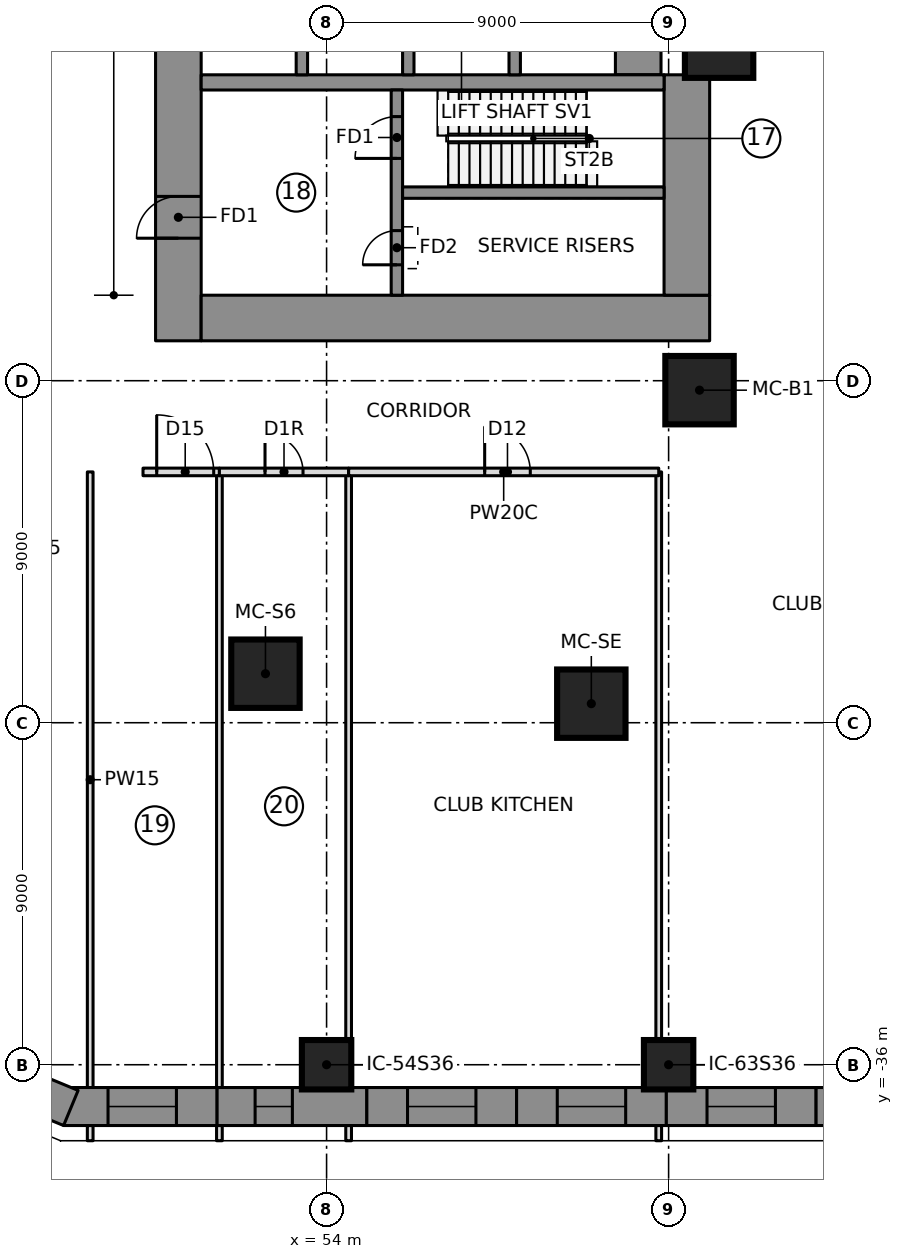
"""IFC4 building model, lengths in metres.
Left out: names, types, materials, properties, quantities, classifications, styles, units other than length and angle.
Written with IfcOpenShell. Run it as: python <this file> out.ifc"""

import sys

from ifc_helpers import new_model, si_unit, direction, frame, frame_2d, origin, origin_2d, place, context, subcontext, project, spatial, polyline, rectangle, outline, extrude, element, fill, save


model = new_model("IFC4")
c1 = context("Model", 3, precision=1e-05, world=origin(), true_north=direction((0.0, 1.0)))
c2 = subcontext(c1, "Body", "Model", "MODEL_VIEW")
j1 = project(units=[si_unit("LENGTHUNIT", "METRE"), si_unit("PLANEANGLEUNIT", "RADIAN")], contexts=[c1])
p1 = place(None, origin())
s1 = spatial("IfcSite", under=j1, at=p1, CompositionType="ELEMENT")
p2 = place(p1, origin())
s2 = spatial("IfcBuilding", under=s1, at=p2, CompositionType="ELEMENT")
p3 = place(p2, frame((0.0, 0.0, 24.0)))
s3 = spatial("IfcBuildingStorey", under=s2, at=p3, CompositionType="ELEMENT", Elevation=24.0)
p4 = place(p3, frame((50.1, -16.95, 0.0), z_axis=(0.0, 0.0, 1.0), x_axis=(0.0, 1.0, 0.0)))
e1 = element("IfcWall", 1, at=p4, inside=s3, PredefinedType="SHEAR", context=c2, shape_type="SweptSolid", body=[
    extrude(rectangle(XDim=10.3, YDim=1.2, at=frame_2d((5.15, 0.0))), origin(), (0.0, 0.0, 1.0), 5.0),
])
p5 = place(p4, frame((2.7, 0.0, 0.0)))
e2 = element("IfcOpeningElement", 2, at=p5, cuts=e1, PredefinedType="OPENING", context=c2, shape_type="SweptSolid", body=[
    extrude(rectangle(XDim=1.1, YDim=2.1, at=frame_2d((0.55, 1.05))), frame((0.0, 0.61, 0.0), z_axis=(0.0, -1.0, 0.0), x_axis=(1.0, 0.0, 0.0)), (0.0, 0.0, 1.0), 1.22),
])
p6 = place(p3, frame((50.7, -16.35, 0.0), z_axis=(0.0, 0.0, 1.0), x_axis=(1.0, 0.0, 0.0)))
e3 = element("IfcWall", 3, at=p6, inside=s3, PredefinedType="SHEAR", context=c2, shape_type="SweptSolid", body=[
    extrude(rectangle(XDim=13.38, YDim=1.2, at=frame_2d((6.69, 0.0))), origin(), (0.0, 0.0, 1.0), 5.0),
])
p7 = place(p3, frame((63.48, -15.75, 0.0), z_axis=(0.0, 0.0, 1.0), x_axis=(0.0, 1.0, 0.0)))
e4 = element("IfcWall", 4, at=p7, inside=s3, PredefinedType="SHEAR", context=c2, shape_type="SweptSolid", body=[
    extrude(rectangle(XDim=5.8, YDim=1.2, at=frame_2d((2.9, 0.0))), origin(), (0.0, 0.0, 1.0), 5.0),
])
p8 = place(p3, frame((62.2, -9.95, 0.0), z_axis=(0.0, 0.0, 1.0), x_axis=(0.0, 1.0, 0.0)))
e5 = element("IfcWall", 5, at=p8, inside=s3, PredefinedType="SHEAR", context=c2, shape_type="SweptSolid", body=[
    extrude(rectangle(XDim=19.9, YDim=1.2, at=frame_2d((9.95, 0.0))), origin(), (0.0, 0.0, 1.0), 5.0),
])
p9 = place(p3, frame((50.7, -10.15, 0.0), z_axis=(0.0, 0.0, 1.0), x_axis=(1.0, 0.0, 0.0)))
e6 = element("IfcWall", 6, at=p9, inside=s3, PredefinedType="SHEAR", context=c2, shape_type="SweptSolid", body=[
    extrude(rectangle(XDim=12.18, YDim=0.4, at=frame_2d((6.09, 0.0))), origin(), (0.0, 0.0, 1.0), 5.0),
])
for number, where, z_axis, x_axis in (
    (7, (53.35, -9.95, 0.0), (0.0, 0.0, 1.0), (0.0, 1.0, 0.0)),
    (8, (56.15, -9.95, 0.0), (0.0, 0.0, 1.0), (0.0, 1.0, 0.0)),
    (9, (58.95, -9.95, 0.0), (0.0, 0.0, 1.0), (0.0, 1.0, 0.0)),
):
    element("IfcWall", number, at=place(p3, frame(where, z_axis=z_axis, x_axis=x_axis)), inside=s3, PredefinedType="SHEAR", context=c2, shape_type="SweptSolid", body=[
        extrude(rectangle(XDim=3.0, YDim=0.3, at=frame_2d((1.5, 0.0))), origin(), (0.0, 0.0, 1.0), 5.0),
    ])
p10 = place(p3, frame((55.85, -15.75, 0.0), z_axis=(0.0, 0.0, 1.0), x_axis=(0.0, 1.0, 0.0)))
e10 = element("IfcWall", 10, at=p10, inside=s3, PredefinedType="SHEAR", context=c2, shape_type="SweptSolid", body=[
    extrude(rectangle(XDim=5.4, YDim=0.3, at=frame_2d((2.7, 0.0))), origin(), (0.0, 0.0, 1.0), 5.0),
])
p11 = place(p10, frame((3.6, 0.0, 0.0)))
e11 = element("IfcOpeningElement", 11, at=p11, cuts=e10, PredefinedType="OPENING", context=c2, shape_type="SweptSolid", body=[
    extrude(rectangle(XDim=1.1, YDim=2.1, at=frame_2d((0.55, 1.05))), frame((0.0, 0.16, 0.0), z_axis=(0.0, -1.0, 0.0), x_axis=(1.0, 0.0, 0.0)), (0.0, 0.0, 1.0), 0.32),
])
p12 = place(p10, frame((0.8, 0.0, 0.0)))
e12 = element("IfcOpeningElement", 12, at=p12, cuts=e10, PredefinedType="OPENING", context=c2, shape_type="SweptSolid", body=[
    extrude(rectangle(XDim=0.9, YDim=2.1, at=frame_2d((0.45, 1.05))), frame((0.0, 0.16, 0.0), z_axis=(0.0, -1.0, 0.0), x_axis=(1.0, 0.0, 0.0)), (0.0, 0.0, 1.0), 0.32),
])
p13 = place(p3, frame((56.0, -13.05, 0.0), z_axis=(0.0, 0.0, 1.0), x_axis=(1.0, 0.0, 0.0)))
e13 = element("IfcWall", 13, at=p13, inside=s3, PredefinedType="SHEAR", context=c2, shape_type="SweptSolid", body=[
    extrude(rectangle(XDim=6.88, YDim=0.3, at=frame_2d((3.44, 0.0))), origin(), (0.0, 0.0, 1.0), 5.0),
])
for number, where, z_axis, x_axis in (
    (14, (52.392, -25.71, 0.0), (0.0, 0.0, 1.0), (1.0, 0.0, 0.0)),
    (15, (60.966, -26.499, 0.0), (0.0, 0.0, 1.0), (1.0, 0.0, 0.0)),
    (16, (63.813, -18.249, 0.0), (0.0, 0.0, 1.0), (1.0, 0.0, 0.0)),
    (17, (64.328, -9.131, 0.0), (0.0, 0.0, 1.0), (1.0, 0.0, 0.0)),
):
    element("IfcColumn", number, at=place(p3, frame(where, z_axis=z_axis, x_axis=x_axis)), inside=s3, PredefinedType="COLUMN", context=c2, shape_type="SweptSolid", body=[
        extrude(rectangle(XDim=1.8, YDim=1.8, at=origin_2d()), origin(), (0.0, 0.0, 1.0), 5.0),
    ])
for number, where, z_axis, x_axis in (
    (18, (54.0, -36.0, 0.0), (0.0, 0.0, 1.0), (1.0, 0.0, 0.0)),
    (19, (63.0, -36.0, 0.0), (0.0, 0.0, 1.0), (1.0, 0.0, 0.0)),
):
    element("IfcColumn", number, at=place(p3, frame(where, z_axis=z_axis, x_axis=x_axis)), inside=s3, PredefinedType="COLUMN", context=c2, shape_type="SweptSolid", body=[
        extrude(rectangle(XDim=1.3, YDim=1.3, at=origin_2d()), origin(), (0.0, 0.0, 1.0), 4.65),
    ])
p14 = place(p3, frame((47.179, -37.1, 0.0), z_axis=(0.0, 0.0, 1.0), x_axis=(1.0, 0.0, 0.0)))
e20 = element("IfcWall", 20, at=p14, inside=s3, PredefinedType="NOTDEFINED", context=c2, shape_type="SweptSolid", body=[
    extrude(outline(polyline([(-0.1, -0.5), (3.94, -0.5), (3.94, 0.5), (0.1, 0.5), (-0.1, -0.5)])), origin(), (0.0, 0.0, 1.0), 4.7),
])
p15 = place(p14, frame((1.07, 0.0, 0.9)))
e21 = element("IfcOpeningElement", 21, at=p15, cuts=e20, PredefinedType="OPENING", context=c2, shape_type="SweptSolid", body=[
    extrude(rectangle(XDim=1.8, YDim=2.4, at=frame_2d((0.9, 1.2))), frame((0.0, 0.51, 0.0), z_axis=(0.0, -1.0, 0.0), x_axis=(1.0, 0.0, 0.0)), (0.0, 0.0, 1.0), 1.02),
])
p16 = place(p3, frame((51.119, -37.1, 0.0), z_axis=(0.0, 0.0, 1.0), x_axis=(1.0, 0.0, 0.0)))
e22 = element("IfcWall", 22, at=p16, inside=s3, PredefinedType="NOTDEFINED", context=c2, shape_type="SweptSolid", body=[
    extrude(outline(polyline([(0.0, -0.5), (3.94, -0.5), (3.94, 0.5), (0.0, 0.5), (0.0, -0.5)])), origin(), (0.0, 0.0, 1.0), 4.7),
])
p17 = place(p16, frame((1.0, 0.0, 0.9)))
e23 = element("IfcOpeningElement", 23, at=p17, cuts=e22, PredefinedType="OPENING", context=c2, shape_type="SweptSolid", body=[
    extrude(rectangle(XDim=0.981, YDim=2.4, at=frame_2d((0.49, 1.2))), frame((0.0, 0.51, 0.0), z_axis=(0.0, -1.0, 0.0), x_axis=(1.0, 0.0, 0.0)), (0.0, 0.0, 1.0), 1.02),
])
p18 = place(p3, frame((55.06, -37.1, 0.0), z_axis=(0.0, 0.0, 1.0), x_axis=(1.0, 0.0, 0.0)))
e24 = element("IfcWall", 24, at=p18, inside=s3, PredefinedType="NOTDEFINED", context=c2, shape_type="SweptSolid", body=[
    extrude(outline(polyline([(0.0, -0.5), (3.94, -0.5), (3.94, 0.5), (0.0, 0.5), (0.0, -0.5)])), origin(), (0.0, 0.0, 1.0), 4.7),
])
p19 = place(p18, frame((1.07, 0.0, 0.9)))
e25 = element("IfcOpeningElement", 25, at=p19, cuts=e24, PredefinedType="OPENING", context=c2, shape_type="SweptSolid", body=[
    extrude(rectangle(XDim=1.8, YDim=2.4, at=frame_2d((0.9, 1.2))), frame((0.0, 0.51, 0.0), z_axis=(0.0, -1.0, 0.0), x_axis=(1.0, 0.0, 0.0)), (0.0, 0.0, 1.0), 1.02),
])
p20 = place(p3, frame((59.0, -37.1, 0.0), z_axis=(0.0, 0.0, 1.0), x_axis=(1.0, 0.0, 0.0)))
e26 = element("IfcWall", 26, at=p20, inside=s3, PredefinedType="NOTDEFINED", context=c2, shape_type="SweptSolid", body=[
    extrude(outline(polyline([(0.0, -0.5), (3.94, -0.5), (3.94, 0.5), (0.0, 0.5), (0.0, -0.5)])), origin(), (0.0, 0.0, 1.0), 4.7),
])
p21 = place(p20, frame((1.07, 0.0, 0.9)))
e27 = element("IfcOpeningElement", 27, at=p21, cuts=e26, PredefinedType="OPENING", context=c2, shape_type="SweptSolid", body=[
    extrude(rectangle(XDim=1.8, YDim=2.4, at=frame_2d((0.9, 1.2))), frame((0.0, 0.51, 0.0), z_axis=(0.0, -1.0, 0.0), x_axis=(1.0, 0.0, 0.0)), (0.0, 0.0, 1.0), 1.02),
])
p22 = place(p3, frame((62.94, -37.1, 0.0), z_axis=(0.0, 0.0, 1.0), x_axis=(1.0, 0.0, 0.0)))
e28 = element("IfcWall", 28, at=p22, inside=s3, PredefinedType="NOTDEFINED", context=c2, shape_type="SweptSolid", body=[
    extrude(outline(polyline([(0.0, -0.5), (3.94, -0.5), (3.94, 0.5), (0.0, 0.5), (0.0, -0.5)])), origin(), (0.0, 0.0, 1.0), 4.7),
])
p23 = place(p22, frame((1.07, 0.0, 0.9)))
e29 = element("IfcOpeningElement", 29, at=p23, cuts=e28, PredefinedType="OPENING", context=c2, shape_type="SweptSolid", body=[
    extrude(rectangle(XDim=1.8, YDim=2.4, at=frame_2d((0.9, 1.2))), frame((0.0, 0.51, 0.0), z_axis=(0.0, -1.0, 0.0), x_axis=(1.0, 0.0, 0.0)), (0.0, 0.0, 1.0), 1.02),
])
p24 = place(p3, frame((66.881, -37.1, 0.0), z_axis=(0.0, 0.0, 1.0), x_axis=(1.0, 0.0, 0.0)))
e30 = element("IfcWall", 30, at=p24, inside=s3, PredefinedType="NOTDEFINED", context=c2, shape_type="SweptSolid", body=[
    extrude(outline(polyline([(0.0, -0.5), (4.04, -0.5), (3.841, 0.5), (0.0, 0.5), (0.0, -0.5)])), origin(), (0.0, 0.0, 1.0), 4.7),
])
p25 = place(p24, frame((1.07, 0.0, 0.9)))
e31 = element("IfcOpeningElement", 31, at=p25, cuts=e30, PredefinedType="OPENING", context=c2, shape_type="SweptSolid", body=[
    extrude(rectangle(XDim=1.8, YDim=2.4, at=frame_2d((0.9, 1.2))), frame((0.0, 0.51, 0.0), z_axis=(0.0, -1.0, 0.0), x_axis=(1.0, 0.0, 0.0)), (0.0, 0.0, 1.0), 1.02),
])
p26 = place(p3, frame((44.153, -35.847, 0.0), z_axis=(0.0, 0.0, 1.0), x_axis=(0.923862365102, -0.382724875529, 0.0)))
e32 = element("IfcWall", 32, at=p26, inside=s3, PredefinedType="NOTDEFINED", context=c2, shape_type="SweptSolid", body=[
    extrude(outline(polyline([(-0.207, -0.5), (3.375, -0.5), (3.175, 0.5), (0.207, 0.5), (-0.207, -0.5)])), origin(), (0.0, 0.0, 1.0), 4.7),
])
p27 = place(p3, frame((47.78, -38.0, 0.0), z_axis=(0.0, 0.0, 1.0), x_axis=(0.0, 1.0, 0.0)))
e33 = element("IfcWall", 33, at=p27, inside=s3, PredefinedType="PARTITIONING", context=c2, shape_type="SweptSolid", body=[
    extrude(rectangle(XDim=0.4, YDim=0.15, at=frame_2d((0.2, 0.0))), origin(), (0.0, 0.0, 1.0), 4.55),
])
p28 = place(p3, frame((47.78, -36.6, 0.0), z_axis=(0.0, 0.0, 1.0), x_axis=(0.0, 1.0, 0.0)))
e34 = element("IfcWall", 34, at=p28, inside=s3, PredefinedType="PARTITIONING", context=c2, shape_type="SweptSolid", body=[
    extrude(rectangle(XDim=16.2, YDim=0.15, at=frame_2d((8.1, 0.0))), origin(), (0.0, 0.0, 1.0), 4.55),
])
p29 = place(p3, frame((51.18, -38.0, 0.0), z_axis=(0.0, 0.0, 1.0), x_axis=(0.0, 1.0, 0.0)))
e35 = element("IfcWall", 35, at=p29, inside=s3, PredefinedType="PARTITIONING", context=c2, shape_type="SweptSolid", body=[
    extrude(rectangle(XDim=0.4, YDim=0.15, at=frame_2d((0.2, 0.0))), origin(), (0.0, 0.0, 1.0), 4.55),
])
p30 = place(p3, frame((51.18, -36.6, 0.0), z_axis=(0.0, 0.0, 1.0), x_axis=(0.0, 1.0, 0.0)))
e36 = element("IfcWall", 36, at=p30, inside=s3, PredefinedType="PARTITIONING", context=c2, shape_type="SweptSolid", body=[
    extrude(rectangle(XDim=16.2, YDim=0.15, at=frame_2d((8.1, 0.0))), origin(), (0.0, 0.0, 1.0), 4.55),
])
p31 = place(p3, frame((54.58, -38.0, 0.0), z_axis=(0.0, 0.0, 1.0), x_axis=(0.0, 1.0, 0.0)))
e37 = element("IfcWall", 37, at=p31, inside=s3, PredefinedType="PARTITIONING", context=c2, shape_type="SweptSolid", body=[
    extrude(rectangle(XDim=0.4, YDim=0.15, at=frame_2d((0.2, 0.0))), origin(), (0.0, 0.0, 1.0), 4.55),
])
p32 = place(p3, frame((54.58, -36.6, 0.0), z_axis=(0.0, 0.0, 1.0), x_axis=(0.0, 1.0, 0.0)))
e38 = element("IfcWall", 38, at=p32, inside=s3, PredefinedType="PARTITIONING", context=c2, shape_type="SweptSolid", body=[
    extrude(rectangle(XDim=16.2, YDim=0.15, at=frame_2d((8.1, 0.0))), origin(), (0.0, 0.0, 1.0), 4.55),
])
p33 = place(p3, frame((62.74, -38.0, 0.0), z_axis=(0.0, 0.0, 1.0), x_axis=(0.0, 1.0, 0.0)))
e39 = element("IfcWall", 39, at=p33, inside=s3, PredefinedType="PARTITIONING", context=c2, shape_type="SweptSolid", body=[
    extrude(rectangle(XDim=0.4, YDim=0.15, at=frame_2d((0.2, 0.0))), origin(), (0.0, 0.0, 1.0), 4.55),
])
p34 = place(p3, frame((62.74, -36.6, 0.0), z_axis=(0.0, 0.0, 1.0), x_axis=(0.0, 1.0, 0.0)))
e40 = element("IfcWall", 40, at=p34, inside=s3, PredefinedType="PARTITIONING", context=c2, shape_type="SweptSolid", body=[
    extrude(rectangle(XDim=16.2, YDim=0.15, at=frame_2d((8.1, 0.0))), origin(), (0.0, 0.0, 1.0), 4.55),
])
p35 = place(p3, frame((49.17, -20.4, 0.0), z_axis=(0.0, 0.0, 1.0), x_axis=(1.0, 0.0, 0.0)))
e41 = element("IfcWall", 41, at=p35, inside=s3, PredefinedType="PARTITIONING", context=c2, shape_type="SweptSolid", body=[
    extrude(rectangle(XDim=2.01, YDim=0.2, at=frame_2d((1.005, 0.0))), origin(), (0.0, 0.0, 1.0), 4.55),
])
p36 = place(p35, frame((0.36, 0.0, 0.0)))
e42 = element("IfcOpeningElement", 42, at=p36, cuts=e41, PredefinedType="OPENING", context=c2, shape_type="SweptSolid", body=[
    extrude(rectangle(XDim=1.5, YDim=2.1, at=frame_2d((0.75, 1.05))), frame((0.0, 0.11, 0.0), z_axis=(0.0, -1.0, 0.0), x_axis=(1.0, 0.0, 0.0)), (0.0, 0.0, 1.0), 0.22),
])
p37 = place(p3, frame((51.18, -20.4, 0.0), z_axis=(0.0, 0.0, 1.0), x_axis=(1.0, 0.0, 0.0)))
e43 = element("IfcWall", 43, at=p37, inside=s3, PredefinedType="PARTITIONING", context=c2, shape_type="SweptSolid", body=[
    extrude(rectangle(XDim=3.4, YDim=0.2, at=frame_2d((1.7, 0.0))), origin(), (0.0, 0.0, 1.0), 4.55),
])
p38 = place(p37, frame((1.2, 0.0, 0.0)))
e44 = element("IfcOpeningElement", 44, at=p38, cuts=e43, PredefinedType="OPENING", context=c2, shape_type="SweptSolid", body=[
    extrude(rectangle(XDim=1.0, YDim=2.1, at=frame_2d((0.5, 1.05))), frame((0.0, 0.11, 0.0), z_axis=(0.0, -1.0, 0.0), x_axis=(1.0, 0.0, 0.0)), (0.0, 0.0, 1.0), 0.22),
])
p39 = place(p3, frame((54.58, -20.4, 0.0), z_axis=(0.0, 0.0, 1.0), x_axis=(1.0, 0.0, 0.0)))
e45 = element("IfcWall", 45, at=p39, inside=s3, PredefinedType="PARTITIONING", context=c2, shape_type="SweptSolid", body=[
    extrude(rectangle(XDim=8.16, YDim=0.2, at=frame_2d((4.08, 0.0))), origin(), (0.0, 0.0, 1.0), 4.55),
])
p40 = place(p39, frame((3.58, 0.0, 0.0)))
e46 = element("IfcOpeningElement", 46, at=p40, cuts=e45, PredefinedType="OPENING", context=c2, shape_type="SweptSolid", body=[
    extrude(rectangle(XDim=1.2, YDim=2.1, at=frame_2d((0.6, 1.05))), frame((0.0, 0.11, 0.0), z_axis=(0.0, -1.0, 0.0), x_axis=(1.0, 0.0, 0.0)), (0.0, 0.0, 1.0), 0.22),
])
p41 = place(p15, origin())
e47 = element("IfcWindow", 47, at=p41, inside=s3, PartitioningType="SINGLE_PANEL", PredefinedType="WINDOW", context=c2, shape_type="SweptSolid", body=[
    extrude(rectangle(XDim=1.8, YDim=2.4, at=frame_2d((0.9, 1.2))), frame((0.0, 0.5, 0.0), z_axis=(0.0, -1.0, 0.0), x_axis=(1.0, 0.0, 0.0)), (0.0, 0.0, 1.0), 0.06),
])
fill(e21, e47)
p42 = place(p17, origin())
e48 = element("IfcWindow", 48, at=p42, inside=s3, PartitioningType="SINGLE_PANEL", PredefinedType="WINDOW", context=c2, shape_type="SweptSolid", body=[
    extrude(rectangle(XDim=0.981, YDim=2.4, at=frame_2d((0.49, 1.2))), frame((0.0, 0.5, 0.0), z_axis=(0.0, -1.0, 0.0), x_axis=(1.0, 0.0, 0.0)), (0.0, 0.0, 1.0), 0.06),
])
fill(e23, e48)
p43 = place(p19, origin())
e49 = element("IfcWindow", 49, at=p43, inside=s3, PartitioningType="SINGLE_PANEL", PredefinedType="WINDOW", context=c2, shape_type="SweptSolid", body=[
    extrude(rectangle(XDim=1.8, YDim=2.4, at=frame_2d((0.9, 1.2))), frame((0.0, 0.5, 0.0), z_axis=(0.0, -1.0, 0.0), x_axis=(1.0, 0.0, 0.0)), (0.0, 0.0, 1.0), 0.06),
])
fill(e25, e49)
p44 = place(p21, origin())
e50 = element("IfcWindow", 50, at=p44, inside=s3, PartitioningType="SINGLE_PANEL", PredefinedType="WINDOW", context=c2, shape_type="SweptSolid", body=[
    extrude(rectangle(XDim=1.8, YDim=2.4, at=frame_2d((0.9, 1.2))), frame((0.0, 0.5, 0.0), z_axis=(0.0, -1.0, 0.0), x_axis=(1.0, 0.0, 0.0)), (0.0, 0.0, 1.0), 0.06),
])
fill(e27, e50)
p45 = place(p23, origin())
e51 = element("IfcWindow", 51, at=p45, inside=s3, PartitioningType="SINGLE_PANEL", PredefinedType="WINDOW", context=c2, shape_type="SweptSolid", body=[
    extrude(rectangle(XDim=1.8, YDim=2.4, at=frame_2d((0.9, 1.2))), frame((0.0, 0.5, 0.0), z_axis=(0.0, -1.0, 0.0), x_axis=(1.0, 0.0, 0.0)), (0.0, 0.0, 1.0), 0.06),
])
fill(e29, e51)
p46 = place(p36, origin())
e52 = element("IfcDoor", 52, at=p46, inside=s3, OperationType="DOUBLE_DOOR_SINGLE_SWING", PredefinedType="DOOR", context=c2, shape_type="SweptSolid", body=[
    extrude(rectangle(XDim=1.5, YDim=2.1, at=frame_2d((0.75, 1.05))), frame((0.0, 0.025, 0.0), z_axis=(0.0, -1.0, 0.0), x_axis=(1.0, 0.0, 0.0)), (0.0, 0.0, 1.0), 0.05),
])
fill(e42, e52)
p47 = place(p38, origin())
e53 = element("IfcDoor", 53, at=p47, inside=s3, OperationType="SINGLE_SWING_RIGHT", PredefinedType="DOOR", context=c2, shape_type="SweptSolid", body=[
    extrude(rectangle(XDim=1.0, YDim=2.1, at=frame_2d((0.5, 1.05))), frame((0.0, 0.025, 0.0), z_axis=(0.0, -1.0, 0.0), x_axis=(1.0, 0.0, 0.0)), (0.0, 0.0, 1.0), 0.05),
])
fill(e44, e53)
p48 = place(p40, origin())
e54 = element("IfcDoor", 54, at=p48, inside=s3, OperationType="SINGLE_SWING_RIGHT", PredefinedType="DOOR", context=c2, shape_type="SweptSolid", body=[
    extrude(rectangle(XDim=1.2, YDim=2.1, at=frame_2d((0.6, 1.05))), frame((0.0, 0.025, 0.0), z_axis=(0.0, -1.0, 0.0), x_axis=(1.0, 0.0, 0.0)), (0.0, 0.0, 1.0), 0.05),
])
fill(e46, e54)
p49 = place(p11, origin())
e55 = element("IfcDoor", 55, at=p49, inside=s3, OperationType="SINGLE_SWING_RIGHT", PredefinedType="DOOR", context=c2, shape_type="SweptSolid", body=[
    extrude(rectangle(XDim=1.1, YDim=2.1, at=frame_2d((0.55, 1.05))), frame((0.0, 0.025, 0.0), z_axis=(0.0, -1.0, 0.0), x_axis=(1.0, 0.0, 0.0)), (0.0, 0.0, 1.0), 0.05),
])
fill(e11, e55)
p50 = place(p5, origin())
e56 = element("IfcDoor", 56, at=p50, inside=s3, OperationType="SINGLE_SWING_RIGHT", PredefinedType="DOOR", context=c2, shape_type="SweptSolid", body=[
    extrude(rectangle(XDim=1.1, YDim=2.1, at=frame_2d((0.55, 1.05))), frame((0.0, 0.025, 0.0), z_axis=(0.0, -1.0, 0.0), x_axis=(1.0, 0.0, 0.0)), (0.0, 0.0, 1.0), 0.05),
])
fill(e2, e56)
p51 = place(p12, origin())
e57 = element("IfcDoor", 57, at=p51, inside=s3, OperationType="SINGLE_SWING_LEFT", PredefinedType="DOOR", context=c2, shape_type="SweptSolid", body=[
    extrude(rectangle(XDim=0.9, YDim=2.1, at=frame_2d((0.45, 1.05))), frame((0.0, 0.025, 0.0), z_axis=(0.0, -1.0, 0.0), x_axis=(1.0, 0.0, 0.0)), (0.0, 0.0, 1.0), 0.05),
])
fill(e12, e57)
save(model, sys.argv[1])
